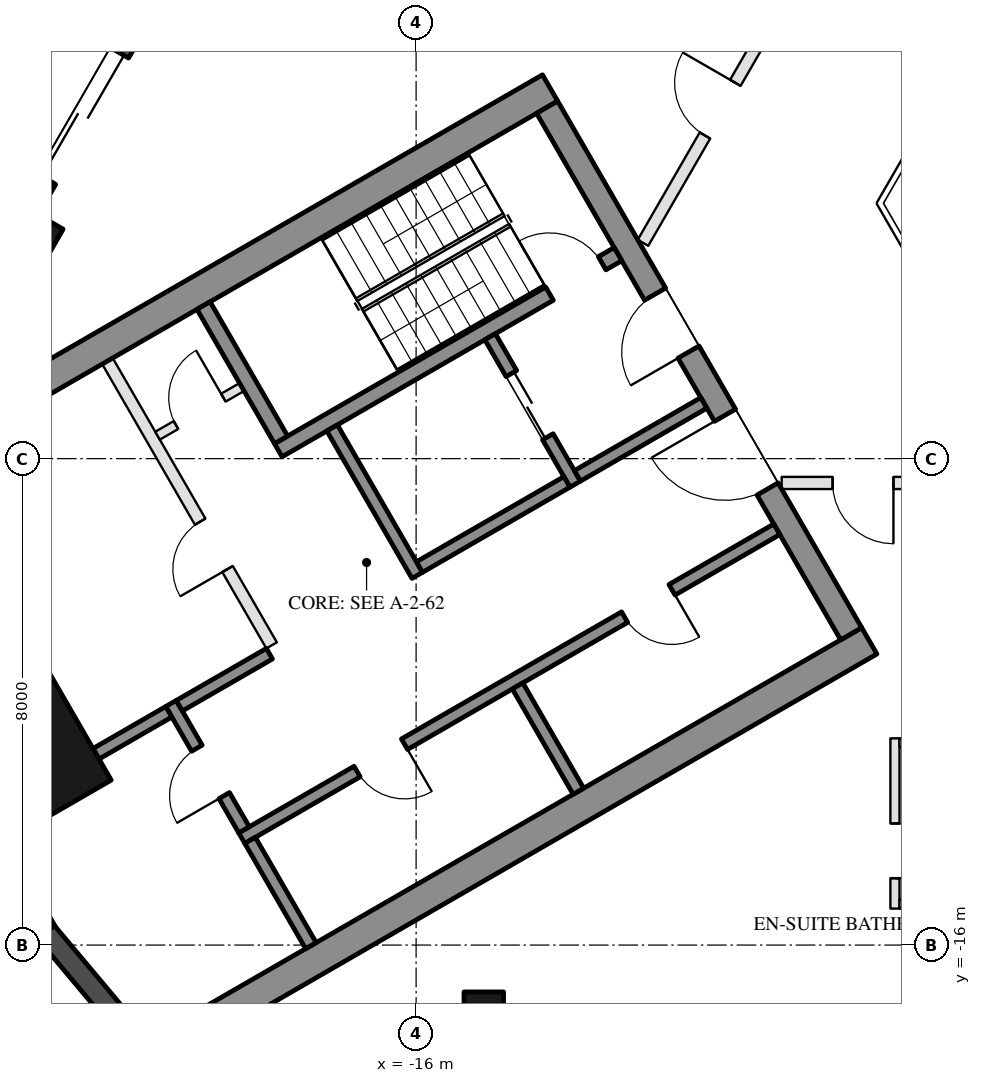
"""IFC4 building model, lengths in metres.
Left out: names, types, materials, properties, quantities, classifications, styles, units other than length and angle.
Written with IfcOpenShell. Run it as: python <this file> out.ifc"""

import sys

from ifc_helpers import new_model, si_unit, direction, frame, frame_2d, origin, origin_2d, place, context, subcontext, project, spatial, rectangle, hollow_rectangle, extrude, boolean, halfspace, element, fill, save


model = new_model("IFC4")
c1 = context("Model", 3, precision=1e-05, world=origin(), true_north=direction((0.0, 1.0)))
c2 = subcontext(c1, "Body", "Model", "MODEL_VIEW")
j1 = project(units=[si_unit("LENGTHUNIT", "METRE"), si_unit("PLANEANGLEUNIT", "RADIAN")], contexts=[c1])
p1 = place(None, origin())
s1 = spatial("IfcSite", under=j1, at=p1, CompositionType="ELEMENT")
p2 = place(p1, origin())
s2 = spatial("IfcBuilding", under=s1, at=p2, CompositionType="ELEMENT")
p3 = place(p2, frame((0.0, 0.0, 268.9)))
s3 = spatial("IfcBuildingStorey", under=s2, at=p3, CompositionType="ELEMENT", Elevation=268.9)
for number, where, z_axis, x_axis in (
    (1, (-14.887, -17.096, 0.0), (0.0, 0.0, 1.0), (-1.0, 0.0, 0.0)),
    (2, (-22.249, -4.345, 0.0), (0.0, 0.0, 1.0), (0.5, 0.866, 0.0)),
):
    element("IfcColumn", number, at=place(p3, frame(where, z_axis=z_axis, x_axis=x_axis)), inside=s3, PredefinedType="COLUMN", context=c2, shape_type="SweptSolid", body=[
        boolean("DIFFERENCE", extrude(hollow_rectangle(XDim=0.65, YDim=0.65, WallThickness=0.03, at=origin_2d()), origin(), (0.0, 0.0, 1.0), 3.7), halfspace(frame((0.0, 0.0, 0.047), z_axis=(0.0, 0.0, 1.0), x_axis=(1.0, 0.0, 0.0)), True)),
    ])
p4 = place(p3, frame((-22.38, -12.921, 0.0), z_axis=(0.0, 0.0, 1.0), x_axis=(-0.5, 0.866025403784, 0.0)))
e3 = element("IfcColumn", 3, at=p4, inside=s3, PredefinedType="COLUMN", context=c2, shape_type="SweptSolid", body=[
    boolean("DIFFERENCE", extrude(hollow_rectangle(XDim=2.0, YDim=2.0, WallThickness=0.05, at=origin_2d()), origin(), (0.0, 0.0, 1.0), 3.7), halfspace(frame((0.0, 0.0, 0.113), z_axis=(0.0, 0.0, 1.0), x_axis=(1.0, 0.0, 0.0)), True)),
])
p5 = place(p3, frame((-19.099, 1.762, 0.0), z_axis=(0.0, 0.0, 1.0), x_axis=(-0.500012817413, -0.866018003521, 0.0)))
e4 = element("IfcWall", 4, at=p5, inside=s3, PredefinedType="SOLIDWALL", context=c2, shape_type="SweptSolid", body=[
    extrude(rectangle(XDim=6.283, YDim=0.35, at=frame_2d((3.142, 0.0))), origin(), (0.0, 0.0, 1.0), 3.55),
])
p6 = place(p5, frame((3.563, 0.0, 0.0)))
e5 = element("IfcOpeningElement", 5, at=p6, cuts=e4, PredefinedType="OPENING", context=c2, shape_type="SweptSolid", body=[
    extrude(rectangle(XDim=2.4, YDim=2.4, at=frame_2d((1.2, 1.2))), frame((0.0, 0.185, 0.0), z_axis=(0.0, -1.0, 0.0), x_axis=(1.0, 0.0, 0.0)), (0.0, 0.0, 1.0), 0.37),
])
p7 = place(p5, frame((0.77, 0.0, 0.3)))
e6 = element("IfcOpeningElement", 6, at=p7, cuts=e4, PredefinedType="OPENING", context=c2, shape_type="SweptSolid", body=[
    extrude(rectangle(XDim=2.4, YDim=2.65, at=frame_2d((1.2, 1.325))), frame((0.0, 0.185, 0.0), z_axis=(0.0, -1.0, 0.0), x_axis=(1.0, 0.0, 0.0)), (0.0, 0.0, 1.0), 0.37),
])
p8 = place(p3, frame((-22.042, -3.627, 0.0), z_axis=(0.0, 0.0, 1.0), x_axis=(-0.866005645448, 0.500034220881, 0.0)))
e7 = element("IfcWall", 7, at=p8, inside=s3, PredefinedType="SOLIDWALL", context=c2, shape_type="SweptSolid", body=[
    extrude(rectangle(XDim=1.22, YDim=0.35, at=frame_2d((0.61, 0.0))), origin(), (0.0, 0.0, 1.0), 3.55),
])
p9 = place(p3, frame((-24.731, -11.2, 0.0), z_axis=(0.0, 0.0, 1.0), x_axis=(0.500025039717, -0.866010946615, 0.0)))
e8 = element("IfcWall", 8, at=p9, inside=s3, PredefinedType="SOLIDWALL", context=c2, shape_type="SweptSolid", body=[
    extrude(rectangle(XDim=5.331, YDim=0.35, at=frame_2d((2.666, 0.0))), origin(), (0.0, 0.0, 1.0), 3.55),
])
p10 = place(p3, frame((-22.083, -15.792, 0.0), z_axis=(0.0, 0.0, 1.0), x_axis=(0.642756114672, -0.766070869471, 0.0)))
e9 = element("IfcWall", 9, at=p10, inside=s3, PredefinedType="SOLIDWALL", context=c2, shape_type="SweptSolid", body=[
    extrude(rectangle(XDim=1.8, YDim=0.35, at=frame_2d((0.9, 0.0))), origin(), (0.0, 0.0, 1.0), 3.55),
])
for number, where, z_axis, x_axis in (
    (10, (-13.797, -1.903, 0.0), (0.0, 0.0, 1.0), (-0.866, -0.5, 0.0)),
    (11, (-8.547, -10.997, 0.0), (0.0, 0.0, 1.0), (-0.866, -0.5, 0.0)),
):
    element("IfcWall", number, at=place(p3, frame(where, z_axis=z_axis, x_axis=x_axis)), inside=s3, PredefinedType="SHEAR", context=c2, shape_type="SweptSolid", body=[
        extrude(rectangle(XDim=13.031, YDim=0.5, at=frame_2d((6.516, 0.0))), origin(), (0.0, 0.0, 1.0), 3.5),
    ])
p11 = place(p3, frame((-13.845, -2.22, 0.0), z_axis=(0.0, 0.0, 1.0), x_axis=(0.500004234368, -0.866022959057, 0.0)))
e12 = element("IfcWall", 12, at=p11, inside=s3, PredefinedType="SHEAR", context=c2, shape_type="SweptSolid", body=[
    extrude(rectangle(XDim=10.0, YDim=0.4, at=frame_2d((5.0, 0.0))), origin(), (0.0, 0.0, 1.0), 3.5),
])
p12 = place(p11, frame((3.55, 0.0, 0.0)))
e13 = element("IfcOpeningElement", 13, at=p12, cuts=e12, PredefinedType="OPENING", context=c2, shape_type="SweptSolid", body=[
    extrude(rectangle(XDim=1.1, YDim=2.1, at=frame_2d((0.55, 1.05))), frame((0.0, 0.21, 0.0), z_axis=(0.0, -1.0, 0.0), x_axis=(1.0, 0.0, 0.0)), (0.0, 0.0, 1.0), 0.42),
])
p13 = place(p11, frame((5.85, 0.0, 0.0)))
e14 = element("IfcOpeningElement", 14, at=p13, cuts=e12, PredefinedType="OPENING", context=c2, shape_type="SweptSolid", body=[
    extrude(rectangle(XDim=1.4, YDim=2.1, at=frame_2d((0.7, 1.05))), frame((0.0, 0.21, 0.0), z_axis=(0.0, -1.0, 0.0), x_axis=(1.0, 0.0, 0.0)), (0.0, 0.0, 1.0), 0.42),
])
p14 = place(p3, frame((-12.681, -4.636, 0.0), z_axis=(0.0, 0.0, 1.0), x_axis=(-0.866021702275, -0.500006411147, 0.0)))
e15 = element("IfcWall", 15, at=p14, inside=s3, PredefinedType="SHEAR", context=c2, shape_type="SweptSolid", body=[
    extrude(rectangle(XDim=6.45, YDim=0.25, at=frame_2d((3.225, 0.0))), origin(), (0.0, 0.0, 1.0), 3.5),
])
p15 = place(p14, frame((0.3, 0.0, 0.0)))
e16 = element("IfcOpeningElement", 16, at=p15, cuts=e15, PredefinedType="OPENING", context=c2, shape_type="SweptSolid", body=[
    extrude(rectangle(XDim=1.0, YDim=2.1, at=frame_2d((0.5, 1.05))), frame((0.0, 0.135, 0.0), z_axis=(0.0, -1.0, 0.0), x_axis=(1.0, 0.0, 0.0)), (0.0, 0.0, 1.0), 0.27),
])
p16 = place(p3, frame((-19.496, -5.482, 0.0), z_axis=(0.0, 0.0, 1.0), x_axis=(0.499990435942, -0.866030925526, 0.0)))
e17 = element("IfcWall", 17, at=p16, inside=s3, PredefinedType="SHEAR", context=c2, shape_type="SweptSolid", body=[
    extrude(rectangle(XDim=2.55, YDim=0.25, at=frame_2d((1.275, 0.0))), origin(), (0.0, 0.0, 1.0), 3.5),
])
p17 = place(p3, frame((-17.381, -7.495, 0.0), z_axis=(0.0, 0.0, 1.0), x_axis=(0.500011755427, -0.866018616679, 0.0)))
e18 = element("IfcWall", 18, at=p17, inside=s3, PredefinedType="SHEAR", context=c2, shape_type="SweptSolid", body=[
    extrude(rectangle(XDim=2.8, YDim=0.2, at=frame_2d((1.4, 0.0))), origin(), (0.0, 0.0, 1.0), 3.5),
])
p18 = place(p3, frame((-14.783, -5.995, 0.0), z_axis=(0.0, 0.0, 1.0), x_axis=(0.49994636267, -0.866056369097, 0.0)))
e19 = element("IfcWall", 19, at=p18, inside=s3, PredefinedType="SHEAR", context=c2, shape_type="SweptSolid", body=[
    extrude(rectangle(XDim=2.8, YDim=0.2, at=frame_2d((1.4, 0.0))), origin(), (0.0, 0.0, 1.0), 3.5),
])
p19 = place(p18, frame((0.7, 0.0, 0.0)))
e20 = element("IfcOpeningElement", 20, at=p19, cuts=e19, PredefinedType="OPENING", context=c2, shape_type="SweptSolid", body=[
    extrude(rectangle(XDim=1.2, YDim=2.1, at=frame_2d((0.6, 1.05))), frame((0.0, 0.11, 0.0), z_axis=(0.0, -1.0, 0.0), x_axis=(1.0, 0.0, 0.0)), (0.0, 0.0, 1.0), 0.22),
])
p20 = place(p3, frame((-13.52, -8.383, 0.0), z_axis=(0.0, 0.0, 1.0), x_axis=(-0.866034573852, -0.49998411664, 0.0)))
e21 = element("IfcWall", 21, at=p20, inside=s3, PredefinedType="SHEAR", context=c2, shape_type="SweptSolid", body=[
    extrude(rectangle(XDim=2.8, YDim=0.2, at=frame_2d((1.4, 0.0))), origin(), (0.0, 0.0, 1.0), 3.5),
])
p21 = place(p3, frame((-11.268, -7.083, 0.0), z_axis=(0.0, 0.0, 1.0), x_axis=(-0.866050077142, -0.499957262057, 0.0)))
e22 = element("IfcWall", 22, at=p21, inside=s3, PredefinedType="SHEAR", context=c2, shape_type="SweptSolid", body=[
    extrude(rectangle(XDim=2.4, YDim=0.2, at=frame_2d((1.2, 0.0))), origin(), (0.0, 0.0, 1.0), 3.5),
])
p22 = place(p3, frame((-10.068, -9.162, 0.0), z_axis=(0.0, 0.0, 1.0), x_axis=(-0.866032725843, -0.499987317609, 0.0)))
e23 = element("IfcWall", 23, at=p22, inside=s3, PredefinedType="SHEAR", context=c2, shape_type="SweptSolid", body=[
    extrude(rectangle(XDim=10.16, YDim=0.2, at=frame_2d((5.08, 0.0))), origin(), (0.0, 0.0, 1.0), 3.5),
])
p23 = place(p22, frame((1.99, 0.0, 0.0)))
e24 = element("IfcOpeningElement", 24, at=p23, cuts=e23, PredefinedType="OPENING", context=c2, shape_type="SweptSolid", body=[
    extrude(rectangle(XDim=0.9, YDim=2.1, at=frame_2d((0.45, 1.05))), frame((0.0, 0.11, 0.0), z_axis=(0.0, -1.0, 0.0), x_axis=(1.0, 0.0, 0.0)), (0.0, 0.0, 1.0), 0.22),
])
p24 = place(p22, frame((7.07, 0.0, 0.0)))
e25 = element("IfcOpeningElement", 25, at=p24, cuts=e23, PredefinedType="OPENING", context=c2, shape_type="SweptSolid", body=[
    extrude(rectangle(XDim=0.9, YDim=2.1, at=frame_2d((0.45, 1.05))), frame((0.0, 0.11, 0.0), z_axis=(0.0, -1.0, 0.0), x_axis=(1.0, 0.0, 0.0)), (0.0, 0.0, 1.0), 0.22),
])
p25 = place(p3, frame((-20.031, -12.026, 0.0), z_axis=(0.0, 0.0, 1.0), x_axis=(0.500033551112, -0.866006032174, 0.0)))
e26 = element("IfcWall", 26, at=p25, inside=s3, PredefinedType="SHEAR", context=c2, shape_type="SweptSolid", body=[
    extrude(rectangle(XDim=2.4, YDim=0.2, at=frame_2d((1.2, 0.0))), origin(), (0.0, 0.0, 1.0), 3.5),
])
p26 = place(p25, frame((0.85, 0.0, 0.0)))
e27 = element("IfcOpeningElement", 27, at=p26, cuts=e26, PredefinedType="OPENING", context=c2, shape_type="SweptSolid", body=[
    extrude(rectangle(XDim=0.9, YDim=2.1, at=frame_2d((0.45, 1.05))), frame((0.0, 0.11, 0.0), z_axis=(0.0, -1.0, 0.0), x_axis=(1.0, 0.0, 0.0)), (0.0, 0.0, 1.0), 0.22),
])
p27 = place(p3, frame((-18.413, -11.208, 0.0), z_axis=(0.0, 0.0, 1.0), x_axis=(-0.866038183914, -0.499977863513, 0.0)))
e28 = element("IfcWall", 28, at=p27, inside=s3, PredefinedType="SHEAR", context=c2, shape_type="SweptSolid", body=[
    extrude(rectangle(XDim=1.71, YDim=0.2, at=frame_2d((0.855, 0.0))), origin(), (0.0, 0.0, 1.0), 3.5),
])
for number, where, z_axis, x_axis in (
    (29, (-14.331, -11.738, 0.0), (0.0, 0.0, 1.0), (0.5, -0.866, 0.0)),
    (30, (-18.73, -14.278, 0.0), (0.0, 0.0, 1.0), (0.5, -0.866, 0.0)),
):
    element("IfcWall", number, at=place(p3, frame(where, z_axis=z_axis, x_axis=x_axis)), inside=s3, PredefinedType="SHEAR", context=c2, shape_type="SweptSolid", body=[
        extrude(rectangle(XDim=2.0, YDim=0.2, at=frame_2d((1.0, 0.0))), origin(), (0.0, 0.0, 1.0), 3.5),
    ])
p28 = place(p3, frame((-20.067, -12.163, 0.0), z_axis=(0.0, 0.0, 1.0), x_axis=(-0.866094443108, -0.499880401313, 0.0)))
e31 = element("IfcWall", 31, at=p28, inside=s3, PredefinedType="SHEAR", context=c2, shape_type="SweptSolid", body=[
    extrude(rectangle(XDim=1.383, YDim=0.2, at=frame_2d((0.691, 0.0))), origin(), (0.0, 0.0, 1.0), 3.5),
])
p29 = place(p3, frame((-21.076, -6.395, 0.0), z_axis=(0.0, 0.0, 1.0), x_axis=(0.50001468107, -0.866016927499, 0.0)))
e32 = element("IfcWall", 32, at=p29, inside=s3, PredefinedType="PARTITIONING", context=c2, shape_type="SweptSolid", body=[
    extrude(rectangle(XDim=5.4, YDim=0.2, at=frame_2d((2.7, 0.0))), origin(), (0.0, 0.0, 1.0), 3.5),
])
p30 = place(p29, frame((3.05, 0.0, 0.0)))
e33 = element("IfcOpeningElement", 33, at=p30, cuts=e32, PredefinedType="OPENING", context=c2, shape_type="SweptSolid", body=[
    extrude(rectangle(XDim=0.9, YDim=2.1, at=frame_2d((0.45, 1.05))), frame((0.0, 0.11, 0.0), z_axis=(0.0, -1.0, 0.0), x_axis=(1.0, 0.0, 0.0)), (0.0, 0.0, 1.0), 0.22),
])
p31 = place(p3, frame((-18.866, -6.822, 0.0), z_axis=(0.0, 0.0, 1.0), x_axis=(-0.866028054938, -0.499995408039, 0.0)))
e34 = element("IfcWall", 34, at=p31, inside=s3, PredefinedType="PARTITIONING", context=c2, shape_type="SweptSolid", body=[
    extrude(rectangle(XDim=1.6, YDim=0.15, at=frame_2d((0.8, 0.0))), origin(), (0.0, 0.0, 1.0), 3.5),
])
p32 = place(p31, frame((0.35, 0.0, 0.0)))
e35 = element("IfcOpeningElement", 35, at=p32, cuts=e34, PredefinedType="OPENING", context=c2, shape_type="SweptSolid", body=[
    extrude(rectangle(XDim=0.9, YDim=2.1, at=frame_2d((0.45, 1.05))), frame((0.0, 0.085, 0.0), z_axis=(0.0, -1.0, 0.0), x_axis=(1.0, 0.0, 0.0)), (0.0, 0.0, 1.0), 0.17),
])
p33 = place(p3, frame((-6.2, -8.4, 0.0), z_axis=(0.0, 0.0, 1.0), x_axis=(-1.0, 0.0, 0.0)))
e36 = element("IfcWall", 36, at=p33, inside=s3, PredefinedType="PARTITIONING", context=c2, shape_type="SweptSolid", body=[
    extrude(rectangle(XDim=3.788, YDim=0.2, at=frame_2d((1.894, 0.0))), origin(), (0.0, 0.0, 1.0), 3.0),
])
p34 = place(p33, frame((1.95, 0.0, 0.0)))
e37 = element("IfcOpeningElement", 37, at=p34, cuts=e36, PredefinedType="OPENING", context=c2, shape_type="SweptSolid", body=[
    extrude(rectangle(XDim=1.0, YDim=2.1, at=frame_2d((0.5, 1.05))), frame((0.0, 0.11, 0.0), z_axis=(0.0, -1.0, 0.0), x_axis=(1.0, 0.0, 0.0)), (0.0, 0.0, 1.0), 0.22),
])
p35 = place(p3, frame((-8.125, -12.6, 0.0), z_axis=(0.0, 0.0, 1.0), x_axis=(0.0, -1.0, 0.0)))
e38 = element("IfcWall", 38, at=p35, inside=s3, PredefinedType="PARTITIONING", context=c2, shape_type="SweptSolid", body=[
    extrude(rectangle(XDim=2.8, YDim=0.15, at=frame_2d((1.4, 0.0))), origin(), (0.0, 0.0, 1.0), 3.55),
])
p36 = place(p35, frame((1.4, 0.0, 0.0)))
e39 = element("IfcOpeningElement", 39, at=p36, cuts=e38, PredefinedType="OPENING", context=c2, shape_type="SweptSolid", body=[
    extrude(rectangle(XDim=0.9, YDim=2.1, at=frame_2d((0.45, 1.05))), frame((0.0, 0.085, 0.0), z_axis=(0.0, -1.0, 0.0), x_axis=(1.0, 0.0, 0.0)), (0.0, 0.0, 1.0), 0.17),
])
for number, where, z_axis, x_axis in (
    (40, (-8.05, -15.325, 0.0), (0.0, 0.0, 1.0), (1.0, 0.0, 0.0)),
    (41, (-8.05, -12.675, 0.0), (0.0, 0.0, 1.0), (1.0, 0.0, 0.0)),
):
    element("IfcWall", number, at=place(p3, frame(where, z_axis=z_axis, x_axis=x_axis)), inside=s3, PredefinedType="PARTITIONING", context=c2, shape_type="SweptSolid", body=[
        extrude(rectangle(XDim=1.85, YDim=0.15, at=frame_2d((0.925, 0.0))), origin(), (0.0, 0.0, 1.0), 3.0),
    ])
p37 = place(p3, frame((-12.269, -4.45, 0.0), z_axis=(0.0, 0.0, 1.0), x_axis=(0.500023578739, 0.866011790165, 0.0)))
e42 = element("IfcWall", 42, at=p37, inside=s3, PredefinedType="PARTITIONING", context=c2, shape_type="SweptSolid", body=[
    extrude(rectangle(XDim=5.076, YDim=0.2, at=frame_2d((2.538, 0.0))), origin(), (0.0, 0.0, 1.0), 3.0),
])
p38 = place(p37, frame((2.038, 0.0, 0.0)))
e43 = element("IfcOpeningElement", 43, at=p38, cuts=e42, PredefinedType="OPENING", context=c2, shape_type="SweptSolid", body=[
    extrude(rectangle(XDim=1.0, YDim=2.1, at=frame_2d((0.5, 1.05))), frame((0.0, 0.11, 0.0), z_axis=(0.0, -1.0, 0.0), x_axis=(1.0, 0.0, 0.0)), (0.0, 0.0, 1.0), 0.22),
])
p39 = place(p6, frame((2.4, 0.0, 0.0), z_axis=(0.0, 0.0, 1.0), x_axis=(-1.0, 0.0, 0.0)))
e44 = element("IfcDoor", 44, at=p39, inside=s3, OperationType="SLIDING_TO_LEFT", PredefinedType="DOOR", context=c2, shape_type="SweptSolid", body=[
    extrude(rectangle(XDim=2.4, YDim=2.4, at=frame_2d((1.2, 1.2))), frame((0.0, 0.025, 0.0), z_axis=(0.0, -1.0, 0.0), x_axis=(1.0, 0.0, 0.0)), (0.0, 0.0, 1.0), 0.05),
])
fill(e5, e44)
p40 = place(p19, origin())
e45 = element("IfcDoor", 45, at=p40, inside=s3, OperationType="DOUBLE_DOOR_SLIDING", PredefinedType="DOOR", context=c2, shape_type="SweptSolid", body=[
    extrude(rectangle(XDim=1.2, YDim=2.1, at=frame_2d((0.6, 1.05))), frame((0.0, 0.025, 0.0), z_axis=(0.0, -1.0, 0.0), x_axis=(1.0, 0.0, 0.0)), (0.0, 0.0, 1.0), 0.05),
])
fill(e20, e45)
p41 = place(p32, frame((0.9, 0.0, 0.0), z_axis=(0.0, 0.0, 1.0), x_axis=(-1.0, 0.0, 0.0)))
e46 = element("IfcDoor", 46, at=p41, inside=s3, OperationType="SINGLE_SWING_RIGHT", PredefinedType="DOOR", context=c2, shape_type="SweptSolid", body=[
    extrude(rectangle(XDim=0.9, YDim=2.1, at=frame_2d((0.45, 1.05))), frame((0.0, 0.025, 0.0), z_axis=(0.0, -1.0, 0.0), x_axis=(1.0, 0.0, 0.0)), (0.0, 0.0, 1.0), 0.05),
])
fill(e35, e46)
p42 = place(p23, origin())
e47 = element("IfcDoor", 47, at=p42, inside=s3, OperationType="SINGLE_SWING_LEFT", PredefinedType="DOOR", context=c2, shape_type="SweptSolid", body=[
    extrude(rectangle(XDim=0.9, YDim=2.1, at=frame_2d((0.45, 1.05))), frame((0.0, 0.025, 0.0), z_axis=(0.0, -1.0, 0.0), x_axis=(1.0, 0.0, 0.0)), (0.0, 0.0, 1.0), 0.05),
])
fill(e24, e47)
p43 = place(p24, origin())
e48 = element("IfcDoor", 48, at=p43, inside=s3, OperationType="SINGLE_SWING_LEFT", PredefinedType="DOOR", context=c2, shape_type="SweptSolid", body=[
    extrude(rectangle(XDim=0.9, YDim=2.1, at=frame_2d((0.45, 1.05))), frame((0.0, 0.025, 0.0), z_axis=(0.0, -1.0, 0.0), x_axis=(1.0, 0.0, 0.0)), (0.0, 0.0, 1.0), 0.05),
])
fill(e25, e48)
p44 = place(p26, frame((0.9, 0.0, 0.0), z_axis=(0.0, 0.0, 1.0), x_axis=(-1.0, 0.0, 0.0)))
e49 = element("IfcDoor", 49, at=p44, inside=s3, OperationType="SINGLE_SWING_LEFT", PredefinedType="DOOR", context=c2, shape_type="SweptSolid", body=[
    extrude(rectangle(XDim=0.9, YDim=2.1, at=frame_2d((0.45, 1.05))), frame((0.0, 0.025, 0.0), z_axis=(0.0, -1.0, 0.0), x_axis=(1.0, 0.0, 0.0)), (0.0, 0.0, 1.0), 0.05),
])
fill(e27, e49)
p45 = place(p30, frame((0.9, 0.0, 0.0), z_axis=(0.0, 0.0, 1.0), x_axis=(-1.0, 0.0, 0.0)))
e50 = element("IfcDoor", 50, at=p45, inside=s3, OperationType="SINGLE_SWING_LEFT", PredefinedType="DOOR", context=c2, shape_type="SweptSolid", body=[
    extrude(rectangle(XDim=0.9, YDim=2.1, at=frame_2d((0.45, 1.05))), frame((0.0, 0.025, 0.0), z_axis=(0.0, -1.0, 0.0), x_axis=(1.0, 0.0, 0.0)), (0.0, 0.0, 1.0), 0.05),
])
fill(e33, e50)
p46 = place(p12, frame((1.1, 0.0, 0.0), z_axis=(0.0, 0.0, 1.0), x_axis=(-1.0, 0.0, 0.0)))
e51 = element("IfcDoor", 51, at=p46, inside=s3, OperationType="SINGLE_SWING_LEFT", PredefinedType="DOOR", context=c2, shape_type="SweptSolid", body=[
    extrude(rectangle(XDim=1.1, YDim=2.1, at=frame_2d((0.55, 1.05))), frame((0.0, 0.025, 0.0), z_axis=(0.0, -1.0, 0.0), x_axis=(1.0, 0.0, 0.0)), (0.0, 0.0, 1.0), 0.05),
])
fill(e13, e51)
p47 = place(p13, frame((1.4, 0.0, 0.0), z_axis=(0.0, 0.0, 1.0), x_axis=(-1.0, 0.0, 0.0)))
e52 = element("IfcDoor", 52, at=p47, inside=s3, OperationType="DOUBLE_DOOR_SINGLE_SWING", PredefinedType="DOOR", context=c2, shape_type="SweptSolid", body=[
    extrude(rectangle(XDim=1.4, YDim=2.1, at=frame_2d((0.7, 1.05))), frame((0.0, 0.025, 0.0), z_axis=(0.0, -1.0, 0.0), x_axis=(1.0, 0.0, 0.0)), (0.0, 0.0, 1.0), 0.05),
])
fill(e14, e52)
p48 = place(p15, frame((1.0, 0.0, 0.0), z_axis=(0.0, 0.0, 1.0), x_axis=(-1.0, 0.0, 0.0)))
e53 = element("IfcDoor", 53, at=p48, inside=s3, OperationType="SINGLE_SWING_LEFT", PredefinedType="DOOR", context=c2, shape_type="SweptSolid", body=[
    extrude(rectangle(XDim=1.0, YDim=2.1, at=frame_2d((0.5, 1.05))), frame((0.0, 0.025, 0.0), z_axis=(0.0, -1.0, 0.0), x_axis=(1.0, 0.0, 0.0)), (0.0, 0.0, 1.0), 0.05),
])
fill(e16, e53)
p49 = place(p36, origin())
e54 = element("IfcDoor", 54, at=p49, inside=s3, OperationType="SINGLE_SWING_RIGHT", PredefinedType="DOOR", context=c2, shape_type="SweptSolid", body=[
    extrude(rectangle(XDim=0.9, YDim=2.1, at=frame_2d((0.45, 1.05))), frame((0.0, 0.025, 0.0), z_axis=(0.0, -1.0, 0.0), x_axis=(1.0, 0.0, 0.0)), (0.0, 0.0, 1.0), 0.05),
])
fill(e39, e54)
p50 = place(p34, origin())
e55 = element("IfcDoor", 55, at=p50, inside=s3, OperationType="SINGLE_SWING_LEFT", PredefinedType="DOOR", context=c2, shape_type="SweptSolid", body=[
    extrude(rectangle(XDim=1.0, YDim=2.1, at=frame_2d((0.5, 1.05))), frame((0.0, 0.025, 0.0), z_axis=(0.0, -1.0, 0.0), x_axis=(1.0, 0.0, 0.0)), (0.0, 0.0, 1.0), 0.05),
])
fill(e37, e55)
p51 = place(p38, origin())
e56 = element("IfcDoor", 56, at=p51, inside=s3, OperationType="SINGLE_SWING_RIGHT", PredefinedType="DOOR", context=c2, shape_type="SweptSolid", body=[
    extrude(rectangle(XDim=1.0, YDim=2.1, at=frame_2d((0.5, 1.05))), frame((0.0, 0.025, 0.0), z_axis=(0.0, -1.0, 0.0), x_axis=(1.0, 0.0, 0.0)), (0.0, 0.0, 1.0), 0.05),
])
fill(e43, e56)
save(model, sys.argv[1])
